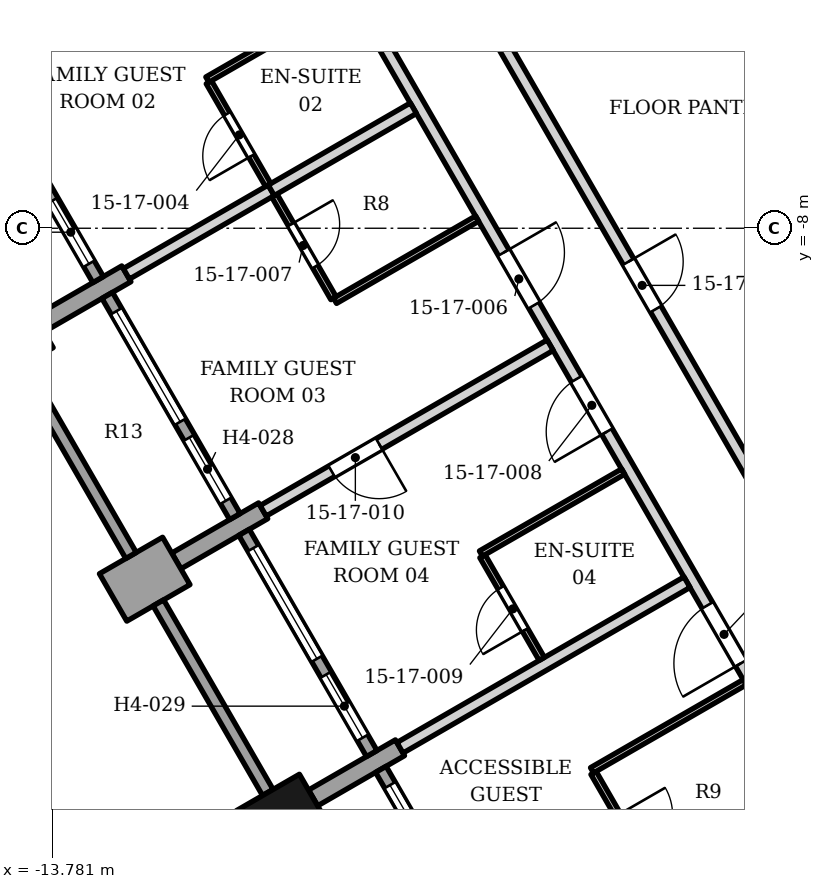
"""IFC4 building model, lengths in metres.
Left out: names, types, materials, properties, quantities, classifications, styles, units other than length and angle.
Written with IfcOpenShell. Run it as: python <this file> out.ifc"""

import sys

from ifc_helpers import new_model, si_unit, direction, frame, frame_2d, origin, origin_2d, place, context, subcontext, project, spatial, rectangle, extrude, element, fill, save


model = new_model("IFC4")
c1 = context("Model", 3, precision=1e-05, world=origin(), true_north=direction((0.0, 1.0)))
c2 = subcontext(c1, "Body", "Model", "MODEL_VIEW")
j1 = project(units=[si_unit("LENGTHUNIT", "METRE"), si_unit("PLANEANGLEUNIT", "RADIAN")], contexts=[c1])
p1 = place(None, origin())
s1 = spatial("IfcSite", under=j1, at=p1, CompositionType="ELEMENT")
p2 = place(p1, origin())
s2 = spatial("IfcBuilding", under=s1, at=p2, CompositionType="ELEMENT")
p3 = place(p2, frame((0.0, 0.0, 76.6)))
s3 = spatial("IfcBuildingStorey", under=s2, at=p3, CompositionType="ELEMENT", Elevation=76.6)
for number, where, z_axis, x_axis in (
    (1, (-14.509, -9.874, 0.0), (0.0, 0.0, 1.0), (0.5, -0.866, 0.0)),
    (2, (-10.009, -17.669, 0.0), (0.0, 0.0, 1.0), (0.5, -0.866, 0.0)),
):
    element("IfcColumn", number, at=place(p3, frame(where, z_axis=z_axis, x_axis=x_axis)), inside=s3, PredefinedType="COLUMN", context=c2, shape_type="SweptSolid", body=[
        extrude(rectangle(XDim=0.9, YDim=1.2, at=origin_2d()), origin(), (0.0, 0.0, 1.0), 3.4),
    ])
p4 = place(p3, frame((-12.561, -8.749, 0.0), z_axis=(0.0, 0.0, 1.0), x_axis=(-0.866003217194, -0.500038426333, 0.0)))
e3 = element("IfcWall", 3, at=p4, inside=s3, PredefinedType="SOLIDWALL", context=c2, shape_type="SweptSolid", body=[
    extrude(rectangle(XDim=1.65, YDim=0.3, at=frame_2d((0.825, 0.0))), origin(), (0.0, 0.0, 1.0), 2.242),
])
p5 = place(p3, frame((-12.779, -14.072, 0.0), z_axis=(0.0, 0.0, 1.0), x_axis=(0.866006032174, 0.500033551112, 0.0)))
e4 = element("IfcWall", 4, at=p5, inside=s3, PredefinedType="SOLIDWALL", context=c2, shape_type="SweptSolid", body=[
    extrude(rectangle(XDim=1.2, YDim=0.9, at=frame_2d((0.6, 0.0))), origin(), (0.0, 0.0, 1.0), 2.63),
])
p6 = place(p3, frame((-11.74, -13.471, 0.0), z_axis=(0.0, 0.0, 1.0), x_axis=(0.866040211805, 0.499974350878, 0.0)))
e5 = element("IfcWall", 5, at=p6, inside=s3, PredefinedType="SOLIDWALL", context=c2, shape_type="SweptSolid", body=[
    extrude(rectangle(XDim=1.65, YDim=0.3, at=frame_2d((0.825, 0.0))), origin(), (0.0, 0.0, 1.0), 2.65),
])
p7 = place(p3, frame((-9.49, -17.369, 0.0), z_axis=(0.0, 0.0, 1.0), x_axis=(0.865976140824, 0.500085316245, 0.0)))
e6 = element("IfcWall", 6, at=p7, inside=s3, PredefinedType="SOLIDWALL", context=c2, shape_type="SweptSolid", body=[
    extrude(rectangle(XDim=1.65, YDim=0.3, at=frame_2d((0.825, 0.0))), origin(), (0.0, 0.0, 1.0), 2.65),
])
p8 = place(p3, frame((-15.125, -5.207, 0.0), z_axis=(0.0, 0.0, 1.0), x_axis=(0.499958946799, -0.866049104564, 0.0)))
e7 = element("IfcWall", 7, at=p8, inside=s3, PredefinedType="ELEMENTEDWALL", context=c2, shape_type="SweptSolid", body=[
    extrude(rectangle(XDim=4.2, YDim=0.2, at=frame_2d((2.1, 0.0))), origin(), (0.0, 0.0, 1.0), 2.242),
])
p9 = place(p8, frame((0.3, 0.0, 0.6)))
e8 = element("IfcOpeningElement", 8, at=p9, cuts=e7, PredefinedType="OPENING", context=c2, shape_type="SweptSolid", body=[
    extrude(rectangle(XDim=2.1, YDim=1.54, at=frame_2d((1.05, 0.77))), frame((0.0, 0.11, 0.0), z_axis=(0.0, -1.0, 0.0), x_axis=(1.0, 0.0, 0.0)), (0.0, 0.0, 1.0), 0.22),
])
p10 = place(p8, frame((2.7, 0.0, 0.0)))
e9 = element("IfcOpeningElement", 9, at=p10, cuts=e7, PredefinedType="OPENING", context=c2, shape_type="SweptSolid", body=[
    extrude(rectangle(XDim=1.2, YDim=2.14, at=frame_2d((0.6, 1.07))), frame((0.0, 0.11, 0.0), z_axis=(0.0, -1.0, 0.0), x_axis=(1.0, 0.0, 0.0)), (0.0, 0.0, 1.0), 0.22),
])
p11 = place(p3, frame((-14.284, -10.264, 0.0), z_axis=(0.0, 0.0, 1.0), x_axis=(0.499982693035, -0.866035395735, 0.0)))
e10 = element("IfcWall", 10, at=p11, inside=s3, PredefinedType="SOLIDWALL", context=c2, shape_type="SweptSolid", body=[
    extrude(rectangle(XDim=3.6, YDim=0.2, at=frame_2d((1.8, 0.0))), origin(), (0.0, 0.0, 1.0), 2.384),
])
p12 = place(p3, frame((-12.875, -9.104, 0.0), z_axis=(0.0, 0.0, 1.0), x_axis=(0.49998411664, -0.866034573852, 0.0)))
e11 = element("IfcWall", 11, at=p12, inside=s3, PredefinedType="ELEMENTEDWALL", context=c2, shape_type="SweptSolid", body=[
    extrude(rectangle(XDim=4.2, YDim=0.2, at=frame_2d((2.1, 0.0))), origin(), (0.0, 0.0, 1.0), 2.242),
])
p13 = place(p12, frame((0.3, 0.0, 0.6)))
e12 = element("IfcOpeningElement", 12, at=p13, cuts=e11, PredefinedType="OPENING", context=c2, shape_type="SweptSolid", body=[
    extrude(rectangle(XDim=2.1, YDim=1.54, at=frame_2d((1.05, 0.77))), frame((0.0, 0.11, 0.0), z_axis=(0.0, -1.0, 0.0), x_axis=(1.0, 0.0, 0.0)), (0.0, 0.0, 1.0), 0.22),
])
p14 = place(p12, frame((2.7, 0.0, 0.0)))
e13 = element("IfcOpeningElement", 13, at=p14, cuts=e11, PredefinedType="OPENING", context=c2, shape_type="SweptSolid", body=[
    extrude(rectangle(XDim=1.2, YDim=2.14, at=frame_2d((0.6, 1.07))), frame((0.0, 0.11, 0.0), z_axis=(0.0, -1.0, 0.0), x_axis=(1.0, 0.0, 0.0)), (0.0, 0.0, 1.0), 0.22),
])
p15 = place(p3, frame((-12.034, -14.161, 0.0), z_axis=(0.0, 0.0, 1.0), x_axis=(0.500012057535, -0.866018442252, 0.0)))
e14 = element("IfcWall", 14, at=p15, inside=s3, PredefinedType="SOLIDWALL", context=c2, shape_type="SweptSolid", body=[
    extrude(rectangle(XDim=3.6, YDim=0.2, at=frame_2d((1.8, 0.0))), origin(), (0.0, 0.0, 1.0), 2.63),
])
p16 = place(p3, frame((-10.625, -13.001, 0.0), z_axis=(0.0, 0.0, 1.0), x_axis=(0.499958946799, -0.866049104564, 0.0)))
e15 = element("IfcWall", 15, at=p16, inside=s3, PredefinedType="ELEMENTEDWALL", context=c2, shape_type="SweptSolid", body=[
    extrude(rectangle(XDim=4.2, YDim=0.2, at=frame_2d((2.1, 0.0))), origin(), (0.0, 0.0, 1.0), 2.65),
])
p17 = place(p16, frame((0.3, 0.0, 0.6)))
e16 = element("IfcOpeningElement", 16, at=p17, cuts=e15, PredefinedType="OPENING", context=c2, shape_type="SweptSolid", body=[
    extrude(rectangle(XDim=2.1, YDim=1.8, at=frame_2d((1.05, 0.9))), frame((0.0, 0.11, 0.0), z_axis=(0.0, -1.0, 0.0), x_axis=(1.0, 0.0, 0.0)), (0.0, 0.0, 1.0), 0.22),
])
p18 = place(p16, frame((2.7, 0.0, 0.0)))
e17 = element("IfcOpeningElement", 17, at=p18, cuts=e15, PredefinedType="OPENING", context=c2, shape_type="SweptSolid", body=[
    extrude(rectangle(XDim=1.2, YDim=2.4, at=frame_2d((0.6, 1.2))), frame((0.0, 0.11, 0.0), z_axis=(0.0, -1.0, 0.0), x_axis=(1.0, 0.0, 0.0)), (0.0, 0.0, 1.0), 0.22),
])
p19 = place(p3, frame((-8.375, -16.898, 0.0), z_axis=(0.0, 0.0, 1.0), x_axis=(0.49998411664, -0.866034573852, 0.0)))
e18 = element("IfcWall", 18, at=p19, inside=s3, PredefinedType="ELEMENTEDWALL", context=c2, shape_type="SweptSolid", body=[
    extrude(rectangle(XDim=4.2, YDim=0.2, at=frame_2d((2.1, 0.0))), origin(), (0.0, 0.0, 1.0), 2.628),
])
p20 = place(p19, frame((0.3, 0.0, 0.6)))
e19 = element("IfcOpeningElement", 19, at=p20, cuts=e18, PredefinedType="OPENING", context=c2, shape_type="SweptSolid", body=[
    extrude(rectangle(XDim=2.1, YDim=1.8, at=frame_2d((1.05, 0.9))), frame((0.0, 0.11, 0.0), z_axis=(0.0, -1.0, 0.0), x_axis=(1.0, 0.0, 0.0)), (0.0, 0.0, 1.0), 0.22),
])
p21 = place(p19, frame((2.7, 0.0, 0.0)))
e20 = element("IfcOpeningElement", 20, at=p21, cuts=e18, PredefinedType="OPENING", context=c2, shape_type="SweptSolid", body=[
    extrude(rectangle(XDim=1.2, YDim=2.4, at=frame_2d((0.6, 1.2))), frame((0.0, 0.11, 0.0), z_axis=(0.0, -1.0, 0.0), x_axis=(1.0, 0.0, 0.0)), (0.0, 0.0, 1.0), 0.22),
])
p22 = place(p3, frame((-11.206, 0.0, 0.0), z_axis=(0.0, 0.0, 1.0), x_axis=(0.500002959525, -0.866023695095, 0.0)))
e21 = element("IfcWall", 21, at=p22, inside=s3, PredefinedType="PARTITIONING", context=c2, shape_type="SweptSolid", body=[
    extrude(rectangle(XDim=22.351, YDim=0.2, at=frame_2d((11.175, 0.0))), origin(), (0.0, 0.0, 1.0), 2.242),
])
p23 = place(p22, frame((0.7, 0.0, 0.0)))
e22 = element("IfcOpeningElement", 22, at=p23, cuts=e21, PredefinedType="OPENING", context=c2, shape_type="SweptSolid", body=[
    extrude(rectangle(XDim=1.0, YDim=2.1, at=frame_2d((0.5, 1.05))), frame((0.0, 0.11, 0.0), z_axis=(0.0, -1.0, 0.0), x_axis=(1.0, 0.0, 0.0)), (0.0, 0.0, 1.0), 0.22),
])
p24 = place(p22, frame((3.1, 0.0, 0.0)))
e23 = element("IfcOpeningElement", 23, at=p24, cuts=e21, PredefinedType="OPENING", context=c2, shape_type="SweptSolid", body=[
    extrude(rectangle(XDim=1.0, YDim=2.1, at=frame_2d((0.5, 1.05))), frame((0.0, 0.11, 0.0), z_axis=(0.0, -1.0, 0.0), x_axis=(1.0, 0.0, 0.0)), (0.0, 0.0, 1.0), 0.22),
])
p25 = place(p22, frame((9.7, 0.0, 0.0)))
e24 = element("IfcOpeningElement", 24, at=p25, cuts=e21, PredefinedType="OPENING", context=c2, shape_type="SweptSolid", body=[
    extrude(rectangle(XDim=1.0, YDim=2.1, at=frame_2d((0.5, 1.05))), frame((0.0, 0.11, 0.0), z_axis=(0.0, -1.0, 0.0), x_axis=(1.0, 0.0, 0.0)), (0.0, 0.0, 1.0), 0.22),
])
p26 = place(p22, frame((12.1, 0.0, 0.0)))
e25 = element("IfcOpeningElement", 25, at=p26, cuts=e21, PredefinedType="OPENING", context=c2, shape_type="SweptSolid", body=[
    extrude(rectangle(XDim=1.0, YDim=2.1, at=frame_2d((0.5, 1.05))), frame((0.0, 0.11, 0.0), z_axis=(0.0, -1.0, 0.0), x_axis=(1.0, 0.0, 0.0)), (0.0, 0.0, 1.0), 0.22),
])
p27 = place(p22, frame((16.4, 0.0, 0.0)))
e26 = element("IfcOpeningElement", 26, at=p27, cuts=e21, PredefinedType="OPENING", context=c2, shape_type="SweptSolid", body=[
    extrude(rectangle(XDim=1.1, YDim=2.1, at=frame_2d((0.55, 1.05))), frame((0.0, 0.11, 0.0), z_axis=(0.0, -1.0, 0.0), x_axis=(1.0, 0.0, 0.0)), (0.0, 0.0, 1.0), 0.22),
])
p28 = place(p22, frame((20.925, 0.0, 0.0)))
e27 = element("IfcOpeningElement", 27, at=p28, cuts=e21, PredefinedType="OPENING", context=c2, shape_type="SweptSolid", body=[
    extrude(rectangle(XDim=1.1, YDim=2.1, at=frame_2d((0.55, 1.05))), frame((0.0, 0.11, 0.0), z_axis=(0.0, -1.0, 0.0), x_axis=(1.0, 0.0, 0.0)), (0.0, 0.0, 1.0), 0.22),
])
p29 = place(p3, frame((-4.877, -16.957, 0.0), z_axis=(0.0, 0.0, 1.0), x_axis=(0.500018594424, -0.866014668023, 0.0)))
e28 = element("IfcWall", 28, at=p29, inside=s3, PredefinedType="PARTITIONING", context=c2, shape_type="SweptSolid", body=[
    extrude(rectangle(XDim=2.45, YDim=0.1, at=frame_2d((1.225, 0.0))), origin(), (0.0, 0.0, 1.0), 2.384),
])
p30 = place(p29, frame((0.8, 0.0, 0.0)))
e29 = element("IfcOpeningElement", 29, at=p30, cuts=e28, PredefinedType="OPENING", context=c2, shape_type="SweptSolid", body=[
    extrude(rectangle(XDim=0.9, YDim=2.1, at=frame_2d((0.45, 1.05))), frame((0.0, 0.06, 0.0), z_axis=(0.0, -1.0, 0.0), x_axis=(1.0, 0.0, 0.0)), (0.0, 0.0, 1.0), 0.12),
])
p31 = place(p3, frame((-4.902, -16.914, 0.0), z_axis=(0.0, 0.0, 1.0), x_axis=(0.866293497561, 0.499535360193, 0.0)))
e30 = element("IfcWall", 30, at=p31, inside=s3, PredefinedType="PARTITIONING", context=c2, shape_type="SweptSolid", body=[
    extrude(rectangle(XDim=2.9, YDim=0.1, at=frame_2d((1.45, 0.0))), origin(), (0.0, 0.0, 1.0), 2.384),
])
p32 = place(p3, frame((-8.061, -16.544, 0.0), z_axis=(0.0, 0.0, 1.0), x_axis=(0.866193043817, 0.499709526468, 0.0)))
e31 = element("IfcWall", 31, at=p32, inside=s3, PredefinedType="PARTITIONING", context=c2, shape_type="SweptSolid", body=[
    extrude(rectangle(XDim=5.45, YDim=0.2, at=frame_2d((2.725, 0.0))), origin(), (0.0, 0.0, 1.0), 2.384),
])
p33 = place(p3, frame((-6.704, -13.393, 0.0), z_axis=(0.0, 0.0, 1.0), x_axis=(0.500098182527, -0.865968710655, 0.0)))
e32 = element("IfcWall", 32, at=p33, inside=s3, PredefinedType="PARTITIONING", context=c2, shape_type="SweptSolid", body=[
    extrude(rectangle(XDim=1.95, YDim=0.1, at=frame_2d((0.975, 0.0))), origin(), (0.0, 0.0, 1.0), 2.628),
])
p34 = place(p33, frame((0.6, 0.0, 0.0)))
e33 = element("IfcOpeningElement", 33, at=p34, cuts=e32, PredefinedType="OPENING", context=c2, shape_type="SweptSolid", body=[
    extrude(rectangle(XDim=0.8, YDim=2.1, at=frame_2d((0.4, 1.05))), frame((0.0, 0.06, 0.0), z_axis=(0.0, -1.0, 0.0), x_axis=(1.0, 0.0, 0.0)), (0.0, 0.0, 1.0), 0.12),
])
p35 = place(p3, frame((-6.729, -13.35, 0.0), z_axis=(0.0, 0.0, 1.0), x_axis=(0.866339109022, 0.499456252518, 0.0)))
e34 = element("IfcWall", 34, at=p35, inside=s3, PredefinedType="PARTITIONING", context=c2, shape_type="SweptSolid", body=[
    extrude(rectangle(XDim=2.7, YDim=0.1, at=frame_2d((1.35, 0.0))), origin(), (0.0, 0.0, 1.0), 2.384),
])
p36 = place(p3, frame((-10.311, -12.646, 0.0), z_axis=(0.0, 0.0, 1.0), x_axis=(0.866193043817, 0.499709526468, 0.0)))
e35 = element("IfcWall", 35, at=p36, inside=s3, PredefinedType="PARTITIONING", context=c2, shape_type="SweptSolid", body=[
    extrude(rectangle(XDim=5.45, YDim=0.2, at=frame_2d((2.725, 0.0))), origin(), (0.0, 0.0, 1.0), 2.242),
])
p37 = place(p36, frame((1.3, 0.0, 0.0)))
e36 = element("IfcOpeningElement", 36, at=p37, cuts=e35, PredefinedType="OPENING", context=c2, shape_type="SweptSolid", body=[
    extrude(rectangle(XDim=0.9, YDim=2.1, at=frame_2d((0.45, 1.05))), frame((0.0, 0.11, 0.0), z_axis=(0.0, -1.0, 0.0), x_axis=(1.0, 0.0, 0.0)), (0.0, 0.0, 1.0), 0.22),
])
p38 = place(p3, frame((-9.129, -9.193, 0.0), z_axis=(0.0, 0.0, 1.0), x_axis=(0.865671764241, 0.500612022024, 0.0)))
e37 = element("IfcWall", 37, at=p38, inside=s3, PredefinedType="PARTITIONING", context=c2, shape_type="SweptSolid", body=[
    extrude(rectangle(XDim=2.7, YDim=0.1, at=frame_2d((1.35, 0.0))), origin(), (0.0, 0.0, 1.0), 2.242),
])
p39 = place(p3, frame((-10.127, -7.46, 0.0), z_axis=(0.0, 0.0, 1.0), x_axis=(0.499223742716, -0.866473112514, 0.0)))
e38 = element("IfcWall", 38, at=p39, inside=s3, PredefinedType="PARTITIONING", context=c2, shape_type="SweptSolid", body=[
    extrude(rectangle(XDim=1.95, YDim=0.1, at=frame_2d((0.975, 0.0))), origin(), (0.0, 0.0, 1.0), 2.473),
])
p40 = place(p39, frame((0.55, 0.0, 0.0)))
e39 = element("IfcOpeningElement", 39, at=p40, cuts=e38, PredefinedType="OPENING", context=c2, shape_type="SweptSolid", body=[
    extrude(rectangle(XDim=0.8, YDim=2.1, at=frame_2d((0.4, 1.05))), frame((0.0, 0.06, 0.0), z_axis=(0.0, -1.0, 0.0), x_axis=(1.0, 0.0, 0.0)), (0.0, 0.0, 1.0), 0.12),
])
p41 = place(p3, frame((-12.561, -8.75, 0.0), z_axis=(0.0, 0.0, 1.0), x_axis=(0.866362904174, 0.499414976018, 0.0)))
e40 = element("IfcWall", 40, at=p41, inside=s3, PredefinedType="PARTITIONING", context=c2, shape_type="SweptSolid", body=[
    extrude(rectangle(XDim=2.75, YDim=0.2, at=frame_2d((1.375, 0.0))), origin(), (0.0, 0.0, 1.0), 2.242),
])
p42 = place(p3, frame((-10.178, -7.376, 0.0), z_axis=(0.0, 0.0, 1.0), x_axis=(0.866036505625, 0.499980770555, 0.0)))
e41 = element("IfcWall", 41, at=p42, inside=s3, PredefinedType="PARTITIONING", context=c2, shape_type="SweptSolid", body=[
    extrude(rectangle(XDim=2.7, YDim=0.2, at=frame_2d((1.35, 0.0))), origin(), (0.0, 0.0, 1.0), 2.473),
])
p43 = place(p3, frame((-11.204, -5.599, 0.0), z_axis=(0.0, 0.0, 1.0), x_axis=(0.500098182527, -0.865968710655, 0.0)))
e42 = element("IfcWall", 42, at=p43, inside=s3, PredefinedType="PARTITIONING", context=c2, shape_type="SweptSolid", body=[
    extrude(rectangle(XDim=1.95, YDim=0.1, at=frame_2d((0.975, 0.0))), origin(), (0.0, 0.0, 1.0), 2.242),
])
p44 = place(p43, frame((0.6, 0.0, 0.0)))
e43 = element("IfcOpeningElement", 43, at=p44, cuts=e42, PredefinedType="OPENING", context=c2, shape_type="SweptSolid", body=[
    extrude(rectangle(XDim=0.8, YDim=2.1, at=frame_2d((0.4, 1.05))), frame((0.0, 0.06, 0.0), z_axis=(0.0, -1.0, 0.0), x_axis=(1.0, 0.0, 0.0)), (0.0, 0.0, 1.0), 0.12),
])
p45 = place(p3, frame((-11.229, -5.556, 0.0), z_axis=(0.0, 0.0, 1.0), x_axis=(0.866339109022, 0.499456252518, 0.0)))
e44 = element("IfcWall", 44, at=p45, inside=s3, PredefinedType="PARTITIONING", context=c2, shape_type="SweptSolid", body=[
    extrude(rectangle(XDim=2.7, YDim=0.1, at=frame_2d((1.35, 0.0))), origin(), (0.0, 0.0, 1.0), 2.242),
])
p46 = place(p3, frame((-6.991, -3.893, 0.0), z_axis=(0.0, 0.0, 1.0), x_axis=(0.499865112403, -0.86610326717, 0.0)))
e45 = element("IfcWall", 45, at=p46, inside=s3, PredefinedType="PARTITIONING", context=c2, shape_type="SweptSolid", body=[
    extrude(rectangle(XDim=13.827, YDim=0.2, at=frame_2d((6.914, 0.0))), origin(), (0.0, 0.0, 1.0), 2.242),
])
p47 = place(p46, frame((5.377, 0.0, 0.0)))
e46 = element("IfcOpeningElement", 46, at=p47, cuts=e45, PredefinedType="OPENING", context=c2, shape_type="SweptSolid", body=[
    extrude(rectangle(XDim=0.9, YDim=2.1, at=frame_2d((0.45, 1.05))), frame((0.0, 0.11, 0.0), z_axis=(0.0, -1.0, 0.0), x_axis=(1.0, 0.0, 0.0)), (0.0, 0.0, 1.0), 0.22),
])
p48 = place(p10, origin())
e47 = element("IfcDoor", 47, at=p48, inside=s3, OperationType="SINGLE_SWING_LEFT", PredefinedType="DOOR", context=c2, shape_type="SweptSolid", body=[
    extrude(rectangle(XDim=1.2, YDim=2.14, at=frame_2d((0.6, 1.07))), frame((0.0, 0.025, 0.0), z_axis=(0.0, -1.0, 0.0), x_axis=(1.0, 0.0, 0.0)), (0.0, 0.0, 1.0), 0.05),
])
fill(e9, e47)
p49 = place(p13, origin())
e48 = element("IfcWindow", 48, at=p49, inside=s3, PartitioningType="SINGLE_PANEL", PredefinedType="WINDOW", context=c2, shape_type="SweptSolid", body=[
    extrude(rectangle(XDim=2.1, YDim=1.54, at=frame_2d((1.05, 0.77))), frame((0.0, 0.03, 0.0), z_axis=(0.0, -1.0, 0.0), x_axis=(1.0, 0.0, 0.0)), (0.0, 0.0, 1.0), 0.06),
])
fill(e12, e48)
p50 = place(p14, origin())
e49 = element("IfcDoor", 49, at=p50, inside=s3, OperationType="SINGLE_SWING_LEFT", PredefinedType="DOOR", context=c2, shape_type="SweptSolid", body=[
    extrude(rectangle(XDim=1.2, YDim=2.14, at=frame_2d((0.6, 1.07))), frame((0.0, 0.025, 0.0), z_axis=(0.0, -1.0, 0.0), x_axis=(1.0, 0.0, 0.0)), (0.0, 0.0, 1.0), 0.05),
])
fill(e13, e49)
p51 = place(p17, origin())
e50 = element("IfcWindow", 50, at=p51, inside=s3, PartitioningType="SINGLE_PANEL", PredefinedType="WINDOW", context=c2, shape_type="SweptSolid", body=[
    extrude(rectangle(XDim=2.1, YDim=1.8, at=frame_2d((1.05, 0.9))), frame((0.0, 0.03, 0.0), z_axis=(0.0, -1.0, 0.0), x_axis=(1.0, 0.0, 0.0)), (0.0, 0.0, 1.0), 0.06),
])
fill(e16, e50)
p52 = place(p18, origin())
e51 = element("IfcDoor", 51, at=p52, inside=s3, OperationType="SINGLE_SWING_LEFT", PredefinedType="DOOR", context=c2, shape_type="SweptSolid", body=[
    extrude(rectangle(XDim=1.2, YDim=2.4, at=frame_2d((0.6, 1.2))), frame((0.0, 0.025, 0.0), z_axis=(0.0, -1.0, 0.0), x_axis=(1.0, 0.0, 0.0)), (0.0, 0.0, 1.0), 0.05),
])
fill(e17, e51)
p53 = place(p20, origin())
e52 = element("IfcWindow", 52, at=p53, inside=s3, PartitioningType="SINGLE_PANEL", PredefinedType="WINDOW", context=c2, shape_type="SweptSolid", body=[
    extrude(rectangle(XDim=2.1, YDim=1.8, at=frame_2d((1.05, 0.9))), frame((0.0, 0.03, 0.0), z_axis=(0.0, -1.0, 0.0), x_axis=(1.0, 0.0, 0.0)), (0.0, 0.0, 1.0), 0.06),
])
fill(e19, e52)
p54 = place(p44, origin())
e53 = element("IfcDoor", 53, at=p54, inside=s3, OperationType="SINGLE_SWING_RIGHT", PredefinedType="DOOR", context=c2, shape_type="SweptSolid", body=[
    extrude(rectangle(XDim=0.8, YDim=2.1, at=frame_2d((0.4, 1.05))), frame((0.0, 0.025, 0.0), z_axis=(0.0, -1.0, 0.0), x_axis=(1.0, 0.0, 0.0)), (0.0, 0.0, 1.0), 0.05),
])
fill(e43, e53)
p55 = place(p25, origin())
e54 = element("IfcDoor", 54, at=p55, inside=s3, OperationType="SINGLE_SWING_LEFT", PredefinedType="DOOR", context=c2, shape_type="SweptSolid", body=[
    extrude(rectangle(XDim=1.0, YDim=2.1, at=frame_2d((0.5, 1.05))), frame((0.0, 0.025, 0.0), z_axis=(0.0, -1.0, 0.0), x_axis=(1.0, 0.0, 0.0)), (0.0, 0.0, 1.0), 0.05),
])
fill(e24, e54)
p56 = place(p40, origin())
e55 = element("IfcDoor", 55, at=p56, inside=s3, OperationType="SINGLE_SWING_LEFT", PredefinedType="DOOR", context=c2, shape_type="SweptSolid", body=[
    extrude(rectangle(XDim=0.8, YDim=2.1, at=frame_2d((0.4, 1.05))), frame((0.0, 0.025, 0.0), z_axis=(0.0, -1.0, 0.0), x_axis=(1.0, 0.0, 0.0)), (0.0, 0.0, 1.0), 0.05),
])
fill(e39, e55)
p57 = place(p26, origin())
e56 = element("IfcDoor", 56, at=p57, inside=s3, OperationType="SINGLE_SWING_RIGHT", PredefinedType="DOOR", context=c2, shape_type="SweptSolid", body=[
    extrude(rectangle(XDim=1.0, YDim=2.1, at=frame_2d((0.5, 1.05))), frame((0.0, 0.025, 0.0), z_axis=(0.0, -1.0, 0.0), x_axis=(1.0, 0.0, 0.0)), (0.0, 0.0, 1.0), 0.05),
])
fill(e25, e56)
p58 = place(p34, origin())
e57 = element("IfcDoor", 57, at=p58, inside=s3, OperationType="SINGLE_SWING_RIGHT", PredefinedType="DOOR", context=c2, shape_type="SweptSolid", body=[
    extrude(rectangle(XDim=0.8, YDim=2.1, at=frame_2d((0.4, 1.05))), frame((0.0, 0.025, 0.0), z_axis=(0.0, -1.0, 0.0), x_axis=(1.0, 0.0, 0.0)), (0.0, 0.0, 1.0), 0.05),
])
fill(e33, e57)
p59 = place(p37, origin())
e58 = element("IfcDoor", 58, at=p59, inside=s3, OperationType="SINGLE_SWING_RIGHT", PredefinedType="DOOR", context=c2, shape_type="SweptSolid", body=[
    extrude(rectangle(XDim=0.9, YDim=2.1, at=frame_2d((0.45, 1.05))), frame((0.0, 0.025, 0.0), z_axis=(0.0, -1.0, 0.0), x_axis=(1.0, 0.0, 0.0)), (0.0, 0.0, 1.0), 0.05),
])
fill(e36, e58)
p60 = place(p27, origin())
e59 = element("IfcDoor", 59, at=p60, inside=s3, OperationType="SINGLE_SWING_RIGHT", PredefinedType="DOOR", context=c2, shape_type="SweptSolid", body=[
    extrude(rectangle(XDim=1.1, YDim=2.1, at=frame_2d((0.55, 1.05))), frame((0.0, 0.025, 0.0), z_axis=(0.0, -1.0, 0.0), x_axis=(1.0, 0.0, 0.0)), (0.0, 0.0, 1.0), 0.05),
])
fill(e26, e59)
p61 = place(p47, origin())
e60 = element("IfcDoor", 60, at=p61, inside=s3, OperationType="SINGLE_SWING_LEFT", PredefinedType="DOOR", context=c2, shape_type="SweptSolid", body=[
    extrude(rectangle(XDim=0.9, YDim=2.1, at=frame_2d((0.45, 1.05))), frame((0.0, 0.025, 0.0), z_axis=(0.0, -1.0, 0.0), x_axis=(1.0, 0.0, 0.0)), (0.0, 0.0, 1.0), 0.05),
])
fill(e46, e60)
save(model, sys.argv[1])
